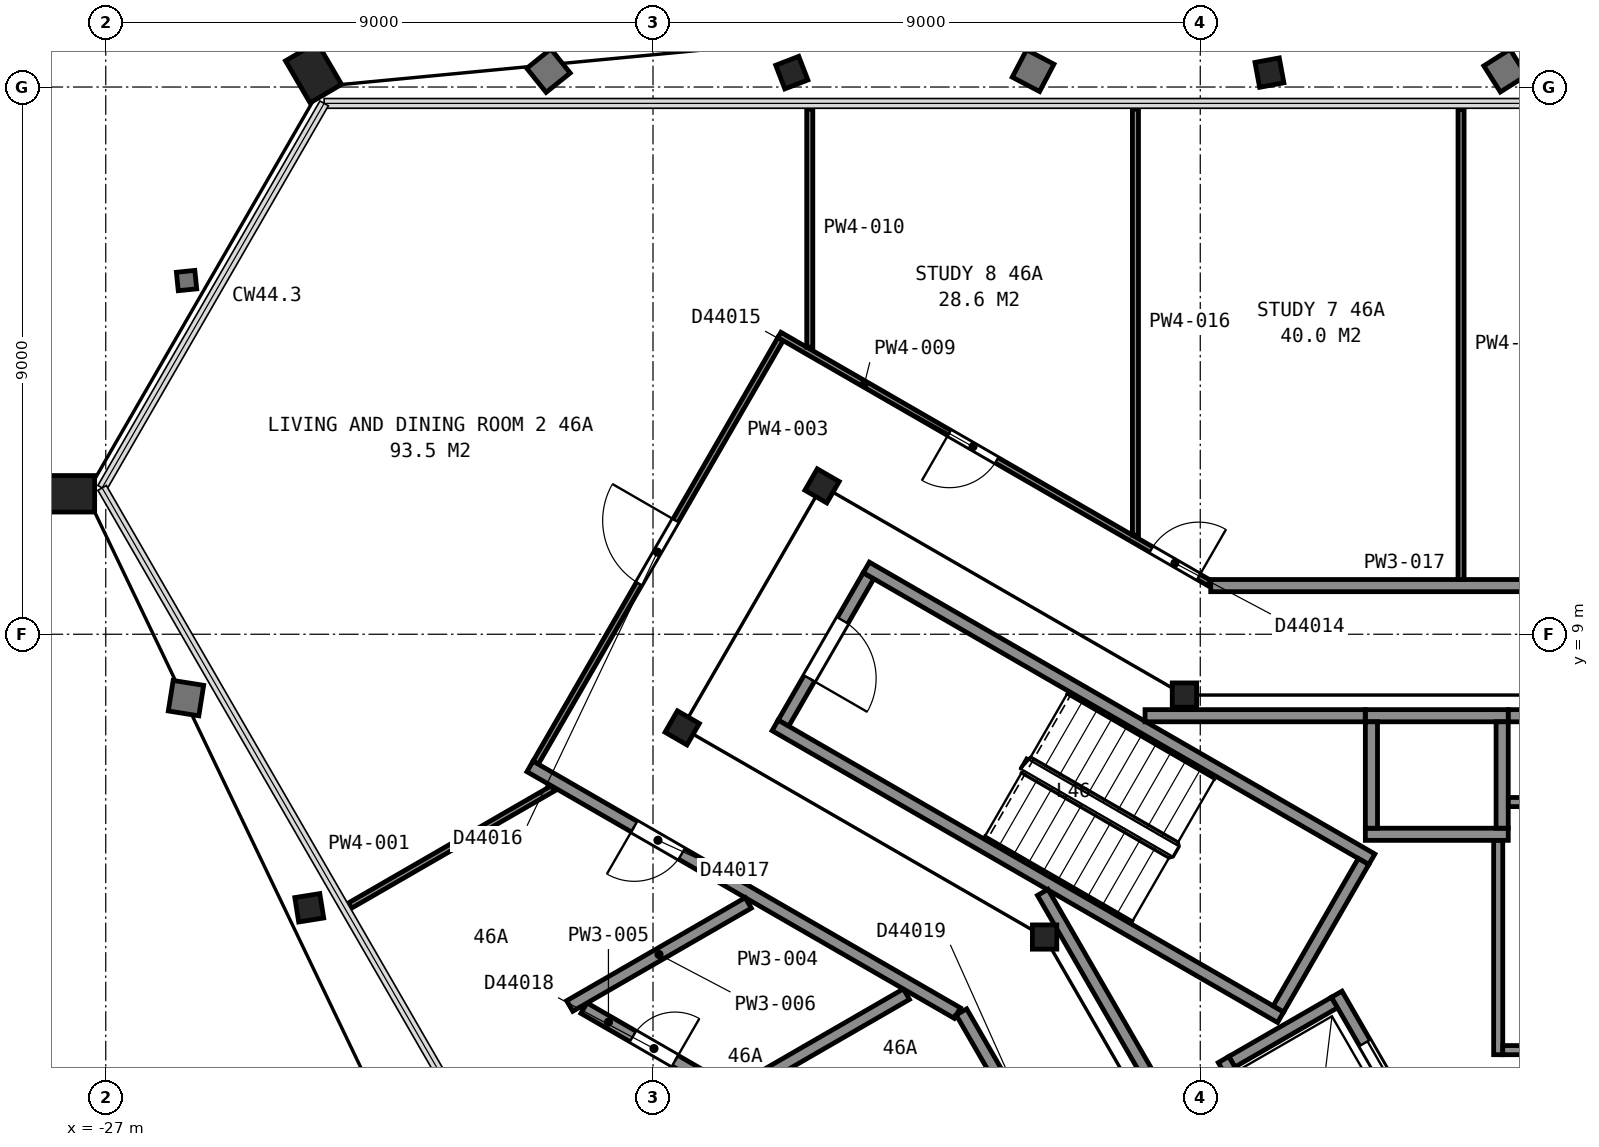
"""IFC4 building model, lengths in metres.
Left out: names, types, materials, properties, quantities, classifications, styles, units other than length and angle.
Written with IfcOpenShell. Run it as: python <this file> out.ifc"""

import sys

from ifc_helpers import new_model, si_unit, direction, frame, frame_2d, origin, origin_2d, place, context, subcontext, project, spatial, rectangle, hollow_rectangle, i_section, extrude, element, fill, save


model = new_model("IFC4")
c1 = context("Model", 3, precision=1e-05, world=origin(), true_north=direction((0.0, 1.0)))
c2 = subcontext(c1, "Body", "Model", "MODEL_VIEW")
j1 = project(units=[si_unit("LENGTHUNIT", "METRE"), si_unit("PLANEANGLEUNIT", "RADIAN")], contexts=[c1])
p1 = place(None, origin())
s1 = spatial("IfcSite", under=j1, at=p1, CompositionType="ELEMENT")
p2 = place(p1, origin())
s2 = spatial("IfcBuilding", under=s1, at=p2, CompositionType="ELEMENT")
p3 = place(p2, frame((0.0, 0.0, 185.8)))
s3 = spatial("IfcBuildingStorey", under=s2, at=p3, CompositionType="ELEMENT", Elevation=185.8)
p4 = place(p3, frame((-7.821, 18.017, 0.035), z_axis=(-0.03447421706, 0.185777725267, 0.981986845713), x_axis=(0.999383372128, -0.000143167918, 0.035112035215)))
e1 = element("IfcColumn", 1, at=p4, inside=s3, PredefinedType="COLUMN", context=c2, shape_type="SweptSolid", body=[
    extrude(i_section(OverallWidth=0.406, OverallDepth=0.417, WebThickness=0.03, FlangeThickness=0.048, FilletRadius=0.015, at=origin_2d()), origin(), (0.0, 0.0, 1.0), 3.697),
])
p5 = place(p3, frame((-15.633, 18.018, 0.04), z_axis=(-0.071585281061, 0.185407860919, 0.980050750035), x_axis=(0.997347551379, 0.000333182044, 0.072785649323)))
e2 = element("IfcColumn", 2, at=p5, inside=s3, PredefinedType="COLUMN", context=c2, shape_type="SweptSolid", body=[
    extrude(i_section(OverallWidth=0.406, OverallDepth=0.417, WebThickness=0.03, FlangeThickness=0.048, FilletRadius=0.015, at=origin_2d()), origin(), (0.0, 0.0, 1.0), 3.694),
])
p6 = place(p3, frame((-23.457, 18.022, 0.065), z_axis=(-0.10821355543, 0.184831424614, 0.976794333981), x_axis=(0.49724252303, 0.860886955952, -0.107812440663)))
e3 = element("IfcColumn", 3, at=p6, inside=s3, PredefinedType="COLUMN", context=c2, shape_type="SweptSolid", body=[
    extrude(hollow_rectangle(XDim=0.6, YDim=0.8, WallThickness=0.05, at=origin_2d()), origin(), (0.0, 0.0, 1.0), 3.655),
])
p7 = place(p3, frame((-27.334, 11.31, 0.065), z_axis=(-0.213838328366, 0.0, 0.976869064574), x_axis=(0.497033455356, 0.860883256594, 0.10880148332)))
e4 = element("IfcColumn", 4, at=p7, inside=s3, PredefinedType="COLUMN", context=c2, shape_type="SweptSolid", body=[
    extrude(hollow_rectangle(XDim=0.6, YDim=0.8, WallThickness=0.05, at=origin_2d()), origin(), (0.0, 0.0, 1.0), 3.655),
])
p8 = place(p3, frame((-23.418, 4.539, 0.04), z_axis=(-0.198532076657, -0.031778345714, 0.979579068418), x_axis=(-0.498721760227, 0.86367768571, -0.073057929632)))
e5 = element("IfcColumn", 5, at=p8, inside=s3, PredefinedType="COLUMN", context=c2, shape_type="SweptSolid", body=[
    extrude(i_section(OverallWidth=0.406, OverallDepth=0.417, WebThickness=0.03, FlangeThickness=0.048, FilletRadius=0.015, at=origin_2d()), origin(), (0.0, 0.0, 1.0), 3.695),
])
p9 = place(p3, frame((-9.26, 8.0, 0.0), z_axis=(0.0, 0.0, 1.0), x_axis=(1.0, 0.0, 0.0)))
e6 = element("IfcColumn", 6, at=p9, inside=s3, PredefinedType="COLUMN", context=c2, shape_type="SweptSolid", body=[
    extrude(i_section(OverallWidth=0.401, OverallDepth=0.399, WebThickness=0.025, FlangeThickness=0.04, FilletRadius=0.015, at=origin_2d()), origin(), (0.0, 0.0, 1.0), 3.7),
])
for number, where, z_axis, x_axis in (
    (7, (-15.22, 11.44, 0.0), (0.0, 0.0, 1.0), (0.5, 0.866, 0.0)),
    (8, (-17.52, 7.46, 0.0), (0.0, 0.0, 1.0), (0.5, 0.866, 0.0)),
):
    element("IfcColumn", number, at=place(p3, frame(where, z_axis=z_axis, x_axis=x_axis)), inside=s3, PredefinedType="COLUMN", context=c2, shape_type="SweptSolid", body=[
        extrude(i_section(OverallWidth=0.406, OverallDepth=0.417, WebThickness=0.03, FlangeThickness=0.048, FilletRadius=0.015, at=origin_2d()), origin(), (0.0, 0.0, 1.0), 3.7),
    ])
p10 = place(p3, frame((-11.56, 4.02, 0.0), z_axis=(0.0, 0.0, 1.0), x_axis=(1.0, 0.0, 0.0)))
e9 = element("IfcColumn", 9, at=p10, inside=s3, PredefinedType="COLUMN", context=c2, shape_type="SweptSolid", body=[
    extrude(i_section(OverallWidth=0.401, OverallDepth=0.399, WebThickness=0.025, FlangeThickness=0.04, FilletRadius=0.015, at=origin_2d()), origin(), (0.0, 0.0, 1.0), 3.7),
])
p11 = place(p3, frame((-14.455, 9.962, 0.0), z_axis=(0.0, 0.0, 1.0), x_axis=(-0.500049511043, -0.865996816683, 0.0)))
e10 = element("IfcWall", 10, at=p11, inside=s3, PredefinedType="PARTITIONING", context=c2, shape_type="SweptSolid", body=[
    extrude(rectangle(XDim=2.8, YDim=0.2, at=frame_2d((1.4, 0.0))), origin(), (0.0, 0.0, 1.0), 3.45),
])
p12 = place(p11, frame((0.85, 0.0, 0.0)))
e11 = element("IfcOpeningElement", 11, at=p12, cuts=e10, PredefinedType="OPENING", context=c2, shape_type="SweptSolid", body=[
    extrude(rectangle(XDim=1.1, YDim=2.1, at=frame_2d((0.55, 1.05))), frame((0.0, 0.11, 0.0), z_axis=(0.0, -1.0, 0.0), x_axis=(1.0, 0.0, 0.0)), (0.0, 0.0, 1.0), 0.22),
])
for number, where, z_axis, x_axis in (
    (12, (-7.678, 2.701, 0.0), (0.0, 0.0, 1.0), (-0.866, 0.5, 0.0)),
    (13, (-6.178, 5.299, 0.0), (0.0, 0.0, 1.0), (-0.866, 0.5, 0.0)),
):
    element("IfcWall", number, at=place(p3, frame(where, z_axis=z_axis, x_axis=x_axis)), inside=s3, PredefinedType="PARTITIONING", context=c2, shape_type="SweptSolid", body=[
        extrude(rectangle(XDim=9.6, YDim=0.2, at=frame_2d((4.8, 0.0))), origin(), (0.0, 0.0, 1.0), 3.45),
    ])
p13 = place(p3, frame((-6.315, 5.262, 0.0), z_axis=(0.0, 0.0, 1.0), x_axis=(-0.500049511043, -0.865996816683, 0.0)))
e14 = element("IfcWall", 14, at=p13, inside=s3, PredefinedType="PARTITIONING", context=c2, shape_type="SweptSolid", body=[
    extrude(rectangle(XDim=2.8, YDim=0.2, at=frame_2d((1.4, 0.0))), origin(), (0.0, 0.0, 1.0), 3.45),
])
for number, where, z_axis, x_axis in (
    (15, (-6.285, 5.71, 0.0), (0.0, 0.0, 1.0), (1.0, 0.0, 0.0)),
    (16, (-6.285, 7.66, 0.0), (0.0, 0.0, 1.0), (1.0, 0.0, 0.0)),
):
    element("IfcWall", number, at=place(p3, frame(where, z_axis=z_axis, x_axis=x_axis)), inside=s3, PredefinedType="PARTITIONING", context=c2, shape_type="SweptSolid", body=[
        extrude(rectangle(XDim=2.35, YDim=0.2, at=frame_2d((1.175, 0.0))), origin(), (0.0, 0.0, 1.0), 3.7),
    ])
p14 = place(p3, frame((-8.48, 1.969, 0.0), z_axis=(0.0, 0.0, 1.0), x_axis=(0.866000020948, 0.500043961785, 0.0)))
e17 = element("IfcWall", 17, at=p14, inside=s3, PredefinedType="PARTITIONING", context=c2, shape_type="SweptSolid", body=[
    extrude(rectangle(XDim=1.95, YDim=0.2, at=frame_2d((0.975, 0.0))), origin(), (0.0, 0.0, 1.0), 3.7),
])
for number, where, z_axis, x_axis in (
    (18, (-4.035, 5.81, 0.0), (0.0, 0.0, 1.0), (0.0, 1.0, 0.0)),
    (19, (-6.185, 5.81, 0.0), (0.0, 0.0, 1.0), (0.0, 1.0, 0.0)),
):
    element("IfcWall", number, at=place(p3, frame(where, z_axis=z_axis, x_axis=x_axis)), inside=s3, PredefinedType="PARTITIONING", context=c2, shape_type="SweptSolid", body=[
        extrude(rectangle(XDim=1.75, YDim=0.2, at=frame_2d((0.875, 0.0))), origin(), (0.0, 0.0, 1.0), 3.7),
    ])
p15 = place(p3, frame((-5.28, 0.525, 0.0), z_axis=(0.0, 0.0, 1.0), x_axis=(-0.500037662692, 0.866003658127, 0.0)))
e20 = element("IfcWall", 20, at=p15, inside=s3, PredefinedType="PARTITIONING", context=c2, shape_type="SweptSolid", body=[
    extrude(rectangle(XDim=2.95, YDim=0.2, at=frame_2d((1.475, 0.0))), origin(), (0.0, 0.0, 1.0), 3.7),
])
p16 = place(p15, frame((0.925, 0.0, 0.0)))
e21 = element("IfcOpeningElement", 21, at=p16, cuts=e20, PredefinedType="OPENING", context=c2, shape_type="SweptSolid", body=[
    extrude(rectangle(XDim=1.1, YDim=2.1, at=frame_2d((0.55, 1.05))), frame((0.0, 0.11, 0.0), z_axis=(0.0, -1.0, 0.0), x_axis=(1.0, 0.0, 0.0)), (0.0, 0.0, 1.0), 0.22),
])
p17 = place(p3, frame((-7.242, -0.376, 0.0), z_axis=(0.0, 0.0, 1.0), x_axis=(-0.499996545922, 0.866027397988, 0.0)))
e22 = element("IfcWall", 22, at=p17, inside=s3, PredefinedType="PARTITIONING", context=c2, shape_type="SweptSolid", body=[
    extrude(rectangle(XDim=2.75, YDim=0.2, at=frame_2d((1.375, 0.0))), origin(), (0.0, 0.0, 1.0), 3.7),
])
p18 = place(p3, frame((-11.591, 4.755, 0.0), z_axis=(0.0, 0.0, 1.0), x_axis=(0.500043977787, -0.866000011708, 0.0)))
e23 = element("IfcWall", 23, at=p18, inside=s3, PredefinedType="PARTITIONING", context=c2, shape_type="SweptSolid", body=[
    extrude(rectangle(XDim=6.617, YDim=0.2, at=frame_2d((3.308, 0.0))), origin(), (0.0, 0.0, 1.0), 3.45),
])
p19 = place(p18, frame((3.695, 0.0, 0.0)))
e24 = element("IfcOpeningElement", 24, at=p19, cuts=e23, PredefinedType="OPENING", context=c2, shape_type="SweptSolid", body=[
    extrude(rectangle(XDim=1.8, YDim=2.1, at=frame_2d((0.9, 1.05))), frame((0.0, 0.11, 0.0), z_axis=(0.0, -1.0, 0.0), x_axis=(1.0, 0.0, 0.0)), (0.0, 0.0, 1.0), 0.22),
])
p20 = place(p3, frame((-9.908, 7.66, 0.0), z_axis=(0.0, 0.0, 1.0), x_axis=(1.0, 0.0, 0.0)))
e25 = element("IfcWall", 25, at=p20, inside=s3, PredefinedType="PARTITIONING", context=c2, shape_type="SweptSolid", body=[
    extrude(rectangle(XDim=3.621, YDim=0.2, at=frame_2d((1.811, 0.0))), origin(), (0.0, 0.0, 1.0), 3.45),
])
p21 = place(p3, frame((-4.1, 2.085, 0.0), z_axis=(0.0, 0.0, 1.0), x_axis=(0.0, 1.0, 0.0)))
e26 = element("IfcWall", 26, at=p21, inside=s3, PredefinedType="PARTITIONING", context=c2, shape_type="SweptSolid", body=[
    extrude(rectangle(XDim=3.523, YDim=0.15, at=frame_2d((1.761, 0.0))), origin(), (0.0, 0.0, 1.0), 3.45),
])
p22 = place(p3, frame((-4.025, 2.16, 0.0), z_axis=(0.0, 0.0, 1.0), x_axis=(1.0, 0.0, 0.0)))
e27 = element("IfcWall", 27, at=p22, inside=s3, PredefinedType="PARTITIONING", context=c2, shape_type="SweptSolid", body=[
    extrude(rectangle(XDim=1.238, YDim=0.15, at=frame_2d((0.619, 0.0))), origin(), (0.0, 0.0, 1.0), 3.45),
])
p23 = place(p3, frame((-3.933, 6.24, 0.0), z_axis=(0.0, 0.0, 1.0), x_axis=(1.0, 0.0, 0.0)))
e28 = element("IfcWall", 28, at=p23, inside=s3, PredefinedType="PARTITIONING", context=c2, shape_type="SweptSolid", body=[
    extrude(rectangle(XDim=3.538, YDim=0.15, at=frame_2d((1.769, 0.0))), origin(), (0.0, 0.0, 1.0), 3.45),
])
p24 = place(p23, frame((1.3, 0.0, 0.0)))
e29 = element("IfcOpeningElement", 29, at=p24, cuts=e28, PredefinedType="OPENING", context=c2, shape_type="SweptSolid", body=[
    extrude(rectangle(XDim=1.0, YDim=2.1, at=frame_2d((0.5, 1.05))), frame((0.0, 0.085, 0.0), z_axis=(0.0, -1.0, 0.0), x_axis=(1.0, 0.0, 0.0)), (0.0, 0.0, 1.0), 0.17),
])
p25 = place(p3, frame((-3.933, 7.66, 0.0), z_axis=(0.0, 0.0, 1.0), x_axis=(1.0, 0.0, 0.0)))
e30 = element("IfcWall", 30, at=p25, inside=s3, PredefinedType="PARTITIONING", context=c2, shape_type="SweptSolid", body=[
    extrude(rectangle(XDim=13.841, YDim=0.2, at=frame_2d((6.92, 0.0))), origin(), (0.0, 0.0, 1.0), 3.45),
])
p26 = place(p3, frame((-22.983, 4.538, 0.0), z_axis=(0.0, 0.0, 1.0), x_axis=(0.865988254995, 0.500064338071, 0.0)))
e31 = element("IfcWall", 31, at=p26, inside=s3, PredefinedType="PARTITIONING", context=c2, shape_type="SweptSolid", body=[
    extrude(rectangle(XDim=3.853, YDim=0.1, at=frame_2d((1.927, 0.0))), origin(), (0.0, 0.0, 1.0), 2.713),
])
p27 = place(p3, frame((-20.064, -0.518, 0.0), z_axis=(0.0, 0.0, 1.0), x_axis=(0.865994046034, 0.500054309285, 0.0)))
e32 = element("IfcWall", 32, at=p27, inside=s3, PredefinedType="PARTITIONING", context=c2, shape_type="SweptSolid", body=[
    extrude(rectangle(XDim=7.196, YDim=0.2, at=frame_2d((3.598, 0.0))), origin(), (0.0, 0.0, 1.0), 2.713),
])
p28 = place(p3, frame((-19.93, 6.888, 0.0), z_axis=(0.0, 0.0, 1.0), x_axis=(0.500413056211, 0.865786794294, 0.0)))
e33 = element("IfcWall", 33, at=p28, inside=s3, PredefinedType="PARTITIONING", context=c2, shape_type="SweptSolid", body=[
    extrude(rectangle(XDim=8.047, YDim=0.1, at=frame_2d((4.023, 0.0))), origin(), (0.0, 0.0, 1.0), 2.713),
])
p29 = place(p28, frame((3.4, 0.0, 0.0)))
e34 = element("IfcOpeningElement", 34, at=p29, cuts=e33, PredefinedType="OPENING", context=c2, shape_type="SweptSolid", body=[
    extrude(rectangle(XDim=1.2, YDim=2.1, at=frame_2d((0.6, 1.05))), frame((0.0, 0.06, 0.0), z_axis=(0.0, -1.0, 0.0), x_axis=(1.0, 0.0, 0.0)), (0.0, 0.0, 1.0), 0.12),
])
p30 = place(p3, frame((-12.995, 2.77, 0.0), z_axis=(0.0, 0.0, 1.0), x_axis=(-0.866100425926, 0.499870035319, 0.0)))
e35 = element("IfcWall", 35, at=p30, inside=s3, PredefinedType="PARTITIONING", context=c2, shape_type="SweptSolid", body=[
    extrude(rectangle(XDim=8.115, YDim=0.2, at=frame_2d((4.058, 0.0))), origin(), (0.0, 0.0, 1.0), 2.713),
])
p31 = place(p30, frame((5.235, 0.0, 0.0)))
e36 = element("IfcOpeningElement", 36, at=p31, cuts=e35, PredefinedType="OPENING", context=c2, shape_type="SweptSolid", body=[
    extrude(rectangle(XDim=0.9, YDim=2.1, at=frame_2d((0.45, 1.05))), frame((0.0, 0.11, 0.0), z_axis=(0.0, -1.0, 0.0), x_axis=(1.0, 0.0, 0.0)), (0.0, 0.0, 1.0), 0.22),
])
p32 = place(p3, frame((-19.136, 2.851, 0.0), z_axis=(0.0, 0.0, 1.0), x_axis=(0.866008217664, -0.500029766052, 0.0)))
e37 = element("IfcWall", 37, at=p32, inside=s3, PredefinedType="PARTITIONING", context=c2, shape_type="SweptSolid", body=[
    extrude(rectangle(XDim=2.659, YDim=0.2, at=frame_2d((1.33, 0.0))), origin(), (0.0, 0.0, 1.0), 2.713),
])
p33 = place(p32, frame((0.93, 0.0, 0.0)))
e38 = element("IfcOpeningElement", 38, at=p33, cuts=e37, PredefinedType="OPENING", context=c2, shape_type="SweptSolid", body=[
    extrude(rectangle(XDim=0.8, YDim=2.1, at=frame_2d((0.4, 1.05))), frame((0.0, 0.11, 0.0), z_axis=(0.0, -1.0, 0.0), x_axis=(1.0, 0.0, 0.0)), (0.0, 0.0, 1.0), 0.22),
])
p34 = place(p3, frame((-19.37, 2.886, 0.0), z_axis=(0.0, 0.0, 1.0), x_axis=(0.866036909293, 0.499980071345, 0.0)))
e39 = element("IfcWall", 39, at=p34, inside=s3, PredefinedType="PARTITIONING", context=c2, shape_type="SweptSolid", body=[
    extrude(rectangle(XDim=3.391, YDim=0.2, at=frame_2d((1.695, 0.0))), origin(), (0.0, 0.0, 1.0), 2.713),
])
p35 = place(p3, frame((-15.921, 13.923, 0.0), z_axis=(0.0, 0.0, 1.0), x_axis=(0.866088973199, -0.499889878377, 0.0)))
e40 = element("IfcWall", 40, at=p35, inside=s3, PredefinedType="PARTITIONING", context=c2, shape_type="SweptSolid", body=[
    extrude(rectangle(XDim=8.163, YDim=0.1, at=frame_2d((4.082, 0.0))), origin(), (0.0, 0.0, 1.0), 2.713),
])
p36 = place(p35, frame((7.06, 0.0, 0.0)))
e41 = element("IfcOpeningElement", 41, at=p36, cuts=e40, PredefinedType="OPENING", context=c2, shape_type="SweptSolid", body=[
    extrude(rectangle(XDim=0.9, YDim=2.1, at=frame_2d((0.45, 1.05))), frame((0.0, 0.06, 0.0), z_axis=(0.0, -1.0, 0.0), x_axis=(1.0, 0.0, 0.0)), (0.0, 0.0, 1.0), 0.12),
])
p37 = place(p35, frame((3.226, 0.0, 0.0)))
e42 = element("IfcOpeningElement", 42, at=p37, cuts=e40, PredefinedType="OPENING", context=c2, shape_type="SweptSolid", body=[
    extrude(rectangle(XDim=0.9, YDim=2.1, at=frame_2d((0.45, 1.05))), frame((0.0, 0.06, 0.0), z_axis=(0.0, -1.0, 0.0), x_axis=(1.0, 0.0, 0.0)), (0.0, 0.0, 1.0), 0.12),
])
p38 = place(p3, frame((-15.422, 13.722, 0.0), z_axis=(0.0, 0.0, 1.0), x_axis=(0.0, 1.0, 0.0)))
e43 = element("IfcWall", 43, at=p38, inside=s3, PredefinedType="PARTITIONING", context=c2, shape_type="SweptSolid", body=[
    extrude(rectangle(XDim=3.913, YDim=0.1, at=frame_2d((1.957, 0.0))), origin(), (0.0, 0.0, 1.0), 2.713),
])
p39 = place(p3, frame((-4.075, -12.545, 0.0), z_axis=(0.0, 0.0, 1.0), x_axis=(-0.499997769292, 0.86602669168, 0.0)))
e44 = element("IfcWall", 44, at=p39, inside=s3, PredefinedType="PARTITIONING", context=c2, shape_type="SweptSolid", body=[
    extrude(rectangle(XDim=17.706, YDim=0.2, at=frame_2d((8.853, 0.0))), origin(), (0.0, 0.0, 1.0), 2.713),
])
p40 = place(p39, frame((14.46, 0.0, 0.0)))
e45 = element("IfcOpeningElement", 45, at=p40, cuts=e44, PredefinedType="OPENING", context=c2, shape_type="SweptSolid", body=[
    extrude(rectangle(XDim=0.9, YDim=2.1, at=frame_2d((0.45, 1.05))), frame((0.0, 0.11, 0.0), z_axis=(0.0, -1.0, 0.0), x_axis=(1.0, 0.0, 0.0)), (0.0, 0.0, 1.0), 0.22),
])
p41 = place(p39, frame((10.896, 0.0, 0.0)))
e46 = element("IfcOpeningElement", 46, at=p41, cuts=e44, PredefinedType="OPENING", context=c2, shape_type="SweptSolid", body=[
    extrude(rectangle(XDim=0.9, YDim=2.1, at=frame_2d((0.45, 1.05))), frame((0.0, 0.11, 0.0), z_axis=(0.0, -1.0, 0.0), x_axis=(1.0, 0.0, 0.0)), (0.0, 0.0, 1.0), 0.22),
])
p42 = place(p39, frame((6.068, 0.0, 0.0)))
e47 = element("IfcOpeningElement", 47, at=p42, cuts=e44, PredefinedType="OPENING", context=c2, shape_type="SweptSolid", body=[
    extrude(rectangle(XDim=0.9, YDim=2.1, at=frame_2d((0.45, 1.05))), frame((0.0, 0.11, 0.0), z_axis=(0.0, -1.0, 0.0), x_axis=(1.0, 0.0, 0.0)), (0.0, 0.0, 1.0), 0.22),
])
p43 = place(p3, frame((-10.066, 10.631, 0.0), z_axis=(0.0, 0.0, 1.0), x_axis=(0.0, 1.0, 0.0)))
e48 = element("IfcWall", 48, at=p43, inside=s3, PredefinedType="PARTITIONING", context=c2, shape_type="SweptSolid", body=[
    extrude(rectangle(XDim=7.004, YDim=0.1, at=frame_2d((3.502, 0.0))), origin(), (0.0, 0.0, 1.0), 2.713),
])
p44 = place(p3, frame((-8.828, 9.8, 0.0), z_axis=(0.0, 0.0, 1.0), x_axis=(1.0, 0.0, 0.0)))
e49 = element("IfcWall", 49, at=p44, inside=s3, PredefinedType="PARTITIONING", context=c2, shape_type="SweptSolid", body=[
    extrude(rectangle(XDim=17.656, YDim=0.2, at=frame_2d((8.828, 0.0))), origin(), (0.0, 0.0, 1.0), 2.713),
])
p45 = place(p44, frame((11.723, 0.0, 0.0)))
e50 = element("IfcOpeningElement", 50, at=p45, cuts=e49, PredefinedType="OPENING", context=c2, shape_type="SweptSolid", body=[
    extrude(rectangle(XDim=0.9, YDim=2.1, at=frame_2d((0.45, 1.05))), frame((0.0, 0.11, 0.0), z_axis=(0.0, -1.0, 0.0), x_axis=(1.0, 0.0, 0.0)), (0.0, 0.0, 1.0), 0.22),
])
p46 = place(p44, frame((6.367, 0.0, 0.0)))
e51 = element("IfcOpeningElement", 51, at=p46, cuts=e49, PredefinedType="OPENING", context=c2, shape_type="SweptSolid", body=[
    extrude(rectangle(XDim=0.9, YDim=2.1, at=frame_2d((0.45, 1.05))), frame((0.0, 0.11, 0.0), z_axis=(0.0, -1.0, 0.0), x_axis=(1.0, 0.0, 0.0)), (0.0, 0.0, 1.0), 0.22),
])
p47 = place(p3, frame((-4.711, 9.9, 0.0), z_axis=(0.0, 0.0, 1.0), x_axis=(0.0, 1.0, 0.0)))
e52 = element("IfcWall", 52, at=p47, inside=s3, PredefinedType="PARTITIONING", context=c2, shape_type="SweptSolid", body=[
    extrude(rectangle(XDim=7.735, YDim=0.1, at=frame_2d((3.868, 0.0))), origin(), (0.0, 0.0, 1.0), 2.713),
])
p48 = place(p12, origin())
e53 = element("IfcDoor", 53, at=p48, inside=s3, OperationType="SINGLE_SWING_RIGHT", PredefinedType="DOOR", context=c2, shape_type="SweptSolid", body=[
    extrude(rectangle(XDim=1.1, YDim=2.1, at=frame_2d((0.55, 1.05))), frame((0.0, 0.025, 0.0), z_axis=(0.0, -1.0, 0.0), x_axis=(1.0, 0.0, 0.0)), (0.0, 0.0, 1.0), 0.05),
])
fill(e11, e53)
p49 = place(p16, origin())
e54 = element("IfcDoor", 54, at=p49, inside=s3, OperationType="SLIDING_TO_LEFT", PredefinedType="DOOR", context=c2, shape_type="SweptSolid", body=[
    extrude(rectangle(XDim=1.1, YDim=2.1, at=frame_2d((0.55, 1.05))), frame((0.0, 0.025, 0.0), z_axis=(0.0, -1.0, 0.0), x_axis=(1.0, 0.0, 0.0)), (0.0, 0.0, 1.0), 0.05),
])
fill(e21, e54)
p50 = place(p29, origin())
e55 = element("IfcDoor", 55, at=p50, inside=s3, OperationType="SINGLE_SWING_RIGHT", PredefinedType="DOOR", context=c2, shape_type="SweptSolid", body=[
    extrude(rectangle(XDim=1.2, YDim=2.1, at=frame_2d((0.6, 1.05))), frame((0.0, 0.025, 0.0), z_axis=(0.0, -1.0, 0.0), x_axis=(1.0, 0.0, 0.0)), (0.0, 0.0, 1.0), 0.05),
])
fill(e34, e55)
p51 = place(p31, origin())
e56 = element("IfcDoor", 56, at=p51, inside=s3, OperationType="SINGLE_SWING_RIGHT", PredefinedType="DOOR", context=c2, shape_type="SweptSolid", body=[
    extrude(rectangle(XDim=0.9, YDim=2.1, at=frame_2d((0.45, 1.05))), frame((0.0, 0.025, 0.0), z_axis=(0.0, -1.0, 0.0), x_axis=(1.0, 0.0, 0.0)), (0.0, 0.0, 1.0), 0.05),
])
fill(e36, e56)
p52 = place(p33, origin())
e57 = element("IfcDoor", 57, at=p52, inside=s3, OperationType="SINGLE_SWING_RIGHT", PredefinedType="DOOR", context=c2, shape_type="SweptSolid", body=[
    extrude(rectangle(XDim=0.8, YDim=2.1, at=frame_2d((0.4, 1.05))), frame((0.0, 0.025, 0.0), z_axis=(0.0, -1.0, 0.0), x_axis=(1.0, 0.0, 0.0)), (0.0, 0.0, 1.0), 0.05),
])
fill(e38, e57)
p53 = place(p36, origin())
e58 = element("IfcDoor", 58, at=p53, inside=s3, OperationType="SINGLE_SWING_RIGHT", PredefinedType="DOOR", context=c2, shape_type="SweptSolid", body=[
    extrude(rectangle(XDim=0.9, YDim=2.1, at=frame_2d((0.45, 1.05))), frame((0.0, 0.025, 0.0), z_axis=(0.0, -1.0, 0.0), x_axis=(1.0, 0.0, 0.0)), (0.0, 0.0, 1.0), 0.05),
])
fill(e41, e58)
p54 = place(p37, origin())
e59 = element("IfcDoor", 59, at=p54, inside=s3, OperationType="SINGLE_SWING_LEFT", PredefinedType="DOOR", context=c2, shape_type="SweptSolid", body=[
    extrude(rectangle(XDim=0.9, YDim=2.1, at=frame_2d((0.45, 1.05))), frame((0.0, 0.025, 0.0), z_axis=(0.0, -1.0, 0.0), x_axis=(1.0, 0.0, 0.0)), (0.0, 0.0, 1.0), 0.05),
])
fill(e42, e59)
save(model, sys.argv[1])
